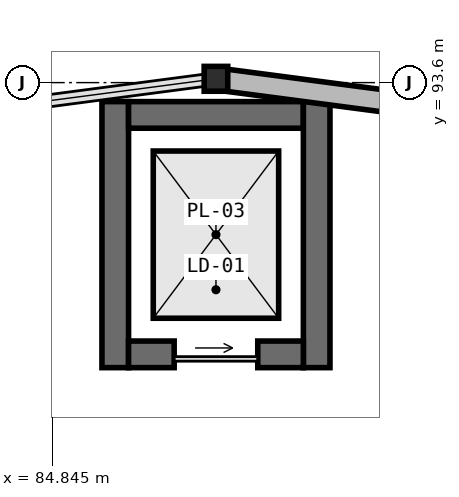
"""IFC4 building model, lengths in metres.
Left out: names, types, materials, properties, quantities, classifications, styles, units other than length and angle.
Written with IfcOpenShell. Run it as: python <this file> out.ifc"""

import sys

from ifc_helpers import new_model, si_unit, direction, frame, frame_2d, origin, origin_2d, place, context, subcontext, project, spatial, rectangle, i_section, extrude, element, fill, save


model = new_model("IFC4")
c1 = context("Model", 3, precision=1e-05, world=origin(), true_north=direction((0.0, 1.0)))
c2 = subcontext(c1, "Body", "Model", "MODEL_VIEW")
j1 = project(units=[si_unit("LENGTHUNIT", "METRE"), si_unit("PLANEANGLEUNIT", "RADIAN")], contexts=[c1])
p1 = place(None, origin())
s1 = spatial("IfcSite", under=j1, at=p1, CompositionType="ELEMENT")
p2 = place(p1, origin())
s2 = spatial("IfcBuilding", under=s1, at=p2, CompositionType="ELEMENT")
p3 = place(p2, origin())
s3 = spatial("IfcBuildingStorey", under=s2, at=p3, CompositionType="ELEMENT", Elevation=0.0)
p4 = place(p3, frame((85.675, 89.85, 0.0), z_axis=(0.0, 0.0, 1.0), x_axis=(0.0, 1.0, 0.0)))
e1 = element("IfcWall", 1, at=p4, inside=s3, PredefinedType="SHEAR", context=c2, shape_type="SweptSolid", body=[
    extrude(rectangle(XDim=3.5, YDim=0.35, at=frame_2d((1.75, 0.0))), origin(), (0.0, 0.0, 1.0), 5.25),
])
p5 = place(p3, frame((85.85, 93.175, 0.0), z_axis=(0.0, 0.0, 1.0), x_axis=(1.0, 0.0, 0.0)))
e2 = element("IfcWall", 2, at=p5, inside=s3, PredefinedType="SHEAR", context=c2, shape_type="SweptSolid", body=[
    extrude(rectangle(XDim=2.3, YDim=0.35, at=frame_2d((1.15, 0.0))), origin(), (0.0, 0.0, 1.0), 5.25),
])
p6 = place(p3, frame((88.325, 93.35, 0.0), z_axis=(0.0, 0.0, 1.0), x_axis=(0.0, -1.0, 0.0)))
e3 = element("IfcWall", 3, at=p6, inside=s3, PredefinedType="SHEAR", context=c2, shape_type="SweptSolid", body=[
    extrude(rectangle(XDim=3.5, YDim=0.35, at=frame_2d((1.75, 0.0))), origin(), (0.0, 0.0, 1.0), 5.25),
])
p7 = place(p3, frame((88.15, 90.025, 0.0), z_axis=(0.0, 0.0, 1.0), x_axis=(-1.0, 0.0, 0.0)))
e4 = element("IfcWall", 4, at=p7, inside=s3, PredefinedType="SHEAR", context=c2, shape_type="SweptSolid", body=[
    extrude(rectangle(XDim=2.3, YDim=0.35, at=frame_2d((1.15, 0.0))), origin(), (0.0, 0.0, 1.0), 5.25),
])
p8 = place(p7, frame((0.6, 0.0, 0.0)))
e5 = element("IfcOpeningElement", 5, at=p8, cuts=e4, PredefinedType="OPENING", context=c2, shape_type="SweptSolid", body=[
    extrude(rectangle(XDim=1.1, YDim=2.15, at=frame_2d((0.55, 1.075))), frame((0.0, 0.185, 0.0), z_axis=(0.0, -1.0, 0.0), x_axis=(1.0, 0.0, 0.0)), (0.0, 0.0, 1.0), 0.37),
])
p9 = place(p3, frame((87.0, 93.65, 0.0), z_axis=(0.0, 0.0, 1.0), x_axis=(1.0, 0.0, 0.0)))
e6 = element("IfcColumn", 6, at=p9, inside=s3, PredefinedType="COLUMN", context=c2, shape_type="SweptSolid", body=[
    extrude(i_section(OverallWidth=0.31, OverallDepth=0.327, WebThickness=0.016, FlangeThickness=0.025, at=origin_2d()), origin(), (0.0, 0.0, 1.0), 5.25),
])
p10 = place(p3, frame((97.0, 93.344, 0.0), z_axis=(0.0, 0.0, 1.0), x_axis=(-0.991454872597, 0.130450126879, 0.0)))
e7 = element("IfcWall", 7, at=p10, inside=s3, PredefinedType="SOLIDWALL", context=c2, shape_type="SweptSolid", body=[
    extrude(rectangle(XDim=10.08, YDim=0.29, at=frame_2d((5.04, 0.0))), origin(), (0.0, 0.0, 1.0), 4.433),
])
p11 = place(p10, frame((4.35, 0.0, 0.95)))
e8 = element("IfcOpeningElement", 8, at=p11, cuts=e7, PredefinedType="OPENING", context=c2, shape_type="SweptSolid", body=[
    extrude(rectangle(XDim=1.38, YDim=1.51, at=frame_2d((0.69, 0.755))), frame((0.0, 0.155, 0.0), z_axis=(0.0, -1.0, 0.0), x_axis=(1.0, 0.0, 0.0)), (0.0, 0.0, 1.0), 0.31),
])
p12 = place(p3, frame((86.994, 94.659, 0.0), z_axis=(0.0, 0.0, 1.0), x_axis=(-0.991454872597, -0.130450126879, 0.0)))
e9 = element("IfcWall", 9, at=p12, inside=s3, PredefinedType="SOLIDWALL", context=c2, shape_type="SweptSolid", body=[
    extrude(rectangle(XDim=10.08, YDim=0.29, at=frame_2d((5.04, 0.0))), origin(), (0.0, 0.0, 1.0), 4.433),
])
p13 = place(p12, frame((4.185, 0.0, 0.95)))
e10 = element("IfcOpeningElement", 10, at=p13, cuts=e9, PredefinedType="OPENING", context=c2, shape_type="SweptSolid", body=[
    extrude(rectangle(XDim=1.71, YDim=1.43, at=frame_2d((0.855, 0.715))), frame((0.0, 0.155, 0.0), z_axis=(0.0, -1.0, 0.0), x_axis=(1.0, 0.0, 0.0)), (0.0, 0.0, 1.0), 0.31),
])
p14 = place(p3, frame((87.004, 93.649, 0.0), z_axis=(0.0, 0.0, 1.0), x_axis=(0.991456749128, -0.130435863969, 0.0)))
e11 = element("IfcWall", 11, at=p14, inside=s3, PredefinedType="SOLIDWALL", context=c2, shape_type="SweptSolid", body=[
    extrude(rectangle(XDim=9.821, YDim=0.29, at=frame_2d((4.911, 0.0))), origin(), (0.0, 0.0, 1.0), 4.516),
])
p15 = place(p14, frame((6.346, 0.0, 0.95)))
e12 = element("IfcOpeningElement", 12, at=p15, cuts=e11, PredefinedType="OPENING", context=c2, shape_type="SweptSolid", body=[
    extrude(rectangle(XDim=2.04, YDim=1.4, at=frame_2d((1.02, 0.7))), frame((0.0, 0.155, 0.0), z_axis=(0.0, -1.0, 0.0), x_axis=(1.0, 0.0, 0.0)), (0.0, 0.0, 1.0), 0.31),
])
p16 = place(p8, origin())
e13 = element("IfcDoor", 13, at=p16, inside=s3, OperationType="SLIDING_TO_LEFT", PredefinedType="USERDEFINED", context=c2, shape_type="SweptSolid", body=[
    extrude(rectangle(XDim=1.1, YDim=2.15, at=frame_2d((0.55, 1.075))), frame((0.0, 0.025, 0.0), z_axis=(0.0, -1.0, 0.0), x_axis=(1.0, 0.0, 0.0)), (0.0, 0.0, 1.0), 0.05),
])
fill(e5, e13)
save(model, sys.argv[1])
